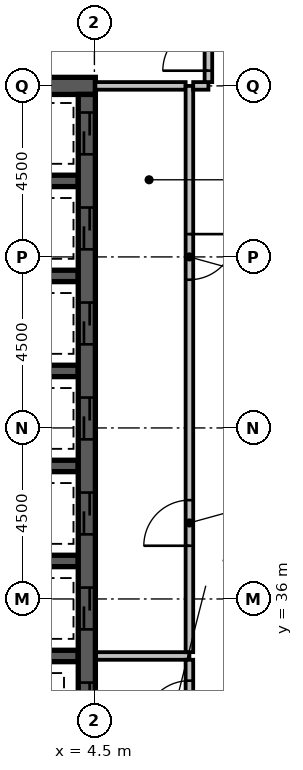
"""IFC4 building model, lengths in metres.
Left out: names, types, materials, properties, quantities, classifications, styles, units other than length and angle.
Written with IfcOpenShell. Run it as: python <this file> out.ifc"""

import sys

from ifc_helpers import new_model, si_unit, direction, frame, frame_2d, origin, place, context, subcontext, project, spatial, rectangle, extrude, element, fill, save


model = new_model("IFC4")
c1 = context("Model", 3, precision=1e-05, world=origin(), true_north=direction((0.0, 1.0)))
c2 = subcontext(c1, "Body", "Model", "MODEL_VIEW")
j1 = project(units=[si_unit("LENGTHUNIT", "METRE"), si_unit("PLANEANGLEUNIT", "RADIAN")], contexts=[c1])
p1 = place(None, origin())
s1 = spatial("IfcSite", under=j1, at=p1, CompositionType="ELEMENT")
p2 = place(p1, origin())
s2 = spatial("IfcBuilding", under=s1, at=p2, CompositionType="ELEMENT")
p3 = place(p2, frame((0.0, 0.0, 179.0)))
s3 = spatial("IfcBuildingStorey", under=s2, at=p3, CompositionType="ELEMENT", Elevation=179.0)
p4 = place(p3, frame((0.275, 49.5, -0.3), z_axis=(0.0, 0.0, 1.0), x_axis=(1.0, 0.0, 0.0)))
e1 = element("IfcWall", 1, at=p4, inside=s3, PredefinedType="SHEAR", context=c2, shape_type="SweptSolid", body=[
    extrude(rectangle(XDim=4.25, YDim=0.45, at=frame_2d((2.125, 0.0))), origin(), (0.0, 0.0, 1.0), 3.6),
])
for number, where, z_axis, x_axis in (
    (2, (0.725, 34.5, -0.3), (0.0, 0.0, 1.0), (1.0, 0.0, 0.0)),
    (3, (0.725, 37.0, -0.3), (0.0, 0.0, 1.0), (1.0, 0.0, 0.0)),
    (4, (0.725, 39.5, -0.3), (0.0, 0.0, 1.0), (1.0, 0.0, 0.0)),
    (5, (0.725, 42.0, -0.3), (0.0, 0.0, 1.0), (1.0, 0.0, 0.0)),
    (6, (0.725, 44.5, -0.3), (0.0, 0.0, 1.0), (1.0, 0.0, 0.0)),
    (7, (0.725, 47.0, -0.3), (0.0, 0.0, 1.0), (1.0, 0.0, 0.0)),
):
    element("IfcWall", number, at=place(p3, frame(where, z_axis=z_axis, x_axis=x_axis)), inside=s3, PredefinedType="SHEAR", context=c2, shape_type="SweptSolid", body=[
        extrude(rectangle(XDim=3.35, YDim=0.3, at=frame_2d((1.675, 0.0))), origin(), (0.0, 0.0, 1.0), 3.6),
    ])
p5 = place(p3, frame((4.3, 27.15, -0.3), z_axis=(0.0, 0.0, 1.0), x_axis=(0.0, 1.0, 0.0)))
e8 = element("IfcWall", 8, at=p5, inside=s3, PredefinedType="SHEAR", context=c2, shape_type="SweptSolid", body=[
    extrude(rectangle(XDim=22.125, YDim=0.45, at=frame_2d((11.062, 0.0))), origin(), (0.0, 0.0, 1.0), 3.6),
])
p6 = place(p5, frame((3.05, 0.0, 0.3)))
e9 = element("IfcOpeningElement", 9, at=p6, cuts=e8, PredefinedType="OPENING", context=c2, shape_type="SweptSolid", body=[
    extrude(rectangle(XDim=1.1, YDim=2.1, at=frame_2d((0.55, 1.05))), frame((0.0, 0.237, 0.0), z_axis=(0.0, -1.0, 0.0), x_axis=(1.0, 0.0, 0.0)), (0.0, 0.0, 1.0), 0.474),
])
p7 = place(p5, frame((0.55, 0.0, 0.3)))
e10 = element("IfcOpeningElement", 10, at=p7, cuts=e8, PredefinedType="OPENING", context=c2, shape_type="SweptSolid", body=[
    extrude(rectangle(XDim=1.1, YDim=2.1, at=frame_2d((0.55, 1.05))), frame((0.0, 0.237, 0.0), z_axis=(0.0, -1.0, 0.0), x_axis=(1.0, 0.0, 0.0)), (0.0, 0.0, 1.0), 0.474),
])
p8 = place(p5, frame((20.55, 0.0, 0.3)))
e11 = element("IfcOpeningElement", 11, at=p8, cuts=e8, PredefinedType="OPENING", context=c2, shape_type="SweptSolid", body=[
    extrude(rectangle(XDim=1.1, YDim=2.1, at=frame_2d((0.55, 1.05))), frame((0.0, 0.237, 0.0), z_axis=(0.0, -1.0, 0.0), x_axis=(1.0, 0.0, 0.0)), (0.0, 0.0, 1.0), 0.474),
])
p9 = place(p5, frame((18.05, 0.0, 0.3)))
e12 = element("IfcOpeningElement", 12, at=p9, cuts=e8, PredefinedType="OPENING", context=c2, shape_type="SweptSolid", body=[
    extrude(rectangle(XDim=1.1, YDim=2.1, at=frame_2d((0.55, 1.05))), frame((0.0, 0.237, 0.0), z_axis=(0.0, -1.0, 0.0), x_axis=(1.0, 0.0, 0.0)), (0.0, 0.0, 1.0), 0.474),
])
p10 = place(p5, frame((15.55, 0.0, 0.3)))
e13 = element("IfcOpeningElement", 13, at=p10, cuts=e8, PredefinedType="OPENING", context=c2, shape_type="SweptSolid", body=[
    extrude(rectangle(XDim=1.1, YDim=2.1, at=frame_2d((0.55, 1.05))), frame((0.0, 0.237, 0.0), z_axis=(0.0, -1.0, 0.0), x_axis=(1.0, 0.0, 0.0)), (0.0, 0.0, 1.0), 0.474),
])
p11 = place(p5, frame((13.05, 0.0, 0.3)))
e14 = element("IfcOpeningElement", 14, at=p11, cuts=e8, PredefinedType="OPENING", context=c2, shape_type="SweptSolid", body=[
    extrude(rectangle(XDim=1.1, YDim=2.1, at=frame_2d((0.55, 1.05))), frame((0.0, 0.237, 0.0), z_axis=(0.0, -1.0, 0.0), x_axis=(1.0, 0.0, 0.0)), (0.0, 0.0, 1.0), 0.474),
])
p12 = place(p5, frame((10.55, 0.0, 0.3)))
e15 = element("IfcOpeningElement", 15, at=p12, cuts=e8, PredefinedType="OPENING", context=c2, shape_type="SweptSolid", body=[
    extrude(rectangle(XDim=1.1, YDim=2.1, at=frame_2d((0.55, 1.05))), frame((0.0, 0.237, 0.0), z_axis=(0.0, -1.0, 0.0), x_axis=(1.0, 0.0, 0.0)), (0.0, 0.0, 1.0), 0.474),
])
p13 = place(p5, frame((8.05, 0.0, 0.3)))
e16 = element("IfcOpeningElement", 16, at=p13, cuts=e8, PredefinedType="OPENING", context=c2, shape_type="SweptSolid", body=[
    extrude(rectangle(XDim=1.1, YDim=2.1, at=frame_2d((0.55, 1.05))), frame((0.0, 0.237, 0.0), z_axis=(0.0, -1.0, 0.0), x_axis=(1.0, 0.0, 0.0)), (0.0, 0.0, 1.0), 0.474),
])
p14 = place(p5, frame((5.55, 0.0, 0.3)))
e17 = element("IfcOpeningElement", 17, at=p14, cuts=e8, PredefinedType="OPENING", context=c2, shape_type="SweptSolid", body=[
    extrude(rectangle(XDim=1.1, YDim=2.1, at=frame_2d((0.55, 1.05))), frame((0.0, 0.237, 0.0), z_axis=(0.0, -1.0, 0.0), x_axis=(1.0, 0.0, 0.0)), (0.0, 0.0, 1.0), 0.474),
])
p15 = place(p3, frame((4.545, 34.5, 0.0), z_axis=(0.0, 0.0, 1.0), x_axis=(1.0, 0.0, 0.0)))
e18 = element("IfcWall", 18, at=p15, inside=s3, PredefinedType="PARTITIONING", context=c2, shape_type="SweptSolid", body=[
    extrude(rectangle(XDim=2.455, YDim=0.2, at=frame_2d((1.228, 0.0))), origin(), (0.0, 0.0, 1.0), 3.3),
])
p16 = place(p3, frame((7.0, 34.6, 0.0), z_axis=(0.0, 0.0, 1.0), x_axis=(0.0, 1.0, 0.0)))
e19 = element("IfcWall", 19, at=p16, inside=s3, PredefinedType="PARTITIONING", context=c2, shape_type="SweptSolid", body=[
    extrude(rectangle(XDim=14.9, YDim=0.2, at=frame_2d((7.45, 0.0))), origin(), (0.0, 0.0, 1.0), 3.3),
])
p17 = place(p16, frame((2.8, 0.0, 0.0)))
e20 = element("IfcOpeningElement", 20, at=p17, cuts=e19, PredefinedType="OPENING", context=c2, shape_type="SweptSolid", body=[
    extrude(rectangle(XDim=1.2, YDim=2.1, at=frame_2d((0.6, 1.05))), frame((0.0, 0.112, 0.0), z_axis=(0.0, -1.0, 0.0), x_axis=(1.0, 0.0, 0.0)), (0.0, 0.0, 1.0), 0.224),
])
p18 = place(p16, frame((9.8, 0.0, 0.0)))
e21 = element("IfcOpeningElement", 21, at=p18, cuts=e19, PredefinedType="OPENING", context=c2, shape_type="SweptSolid", body=[
    extrude(rectangle(XDim=1.2, YDim=2.1, at=frame_2d((0.6, 1.05))), frame((0.0, 0.112, 0.0), z_axis=(0.0, -1.0, 0.0), x_axis=(1.0, 0.0, 0.0)), (0.0, 0.0, 1.0), 0.224),
])
p19 = place(p3, frame((4.525, 49.5, 0.0), z_axis=(0.0, 0.0, 1.0), x_axis=(1.0, 0.0, 0.0)))
e22 = element("IfcWall", 22, at=p19, inside=s3, PredefinedType="PARTITIONING", context=c2, shape_type="SweptSolid", body=[
    extrude(rectangle(XDim=2.375, YDim=0.2, at=frame_2d((1.188, 0.0))), origin(), (0.0, 0.0, 1.0), 3.3),
])
p20 = place(p3, frame((7.0, 32.1, 0.0), z_axis=(0.0, 0.0, 1.0), x_axis=(0.0, 1.0, 0.0)))
e23 = element("IfcWall", 23, at=p20, inside=s3, PredefinedType="PARTITIONING", context=c2, shape_type="SweptSolid", body=[
    extrude(rectangle(XDim=2.3, YDim=0.2, at=frame_2d((1.15, 0.0))), origin(), (0.0, 0.0, 1.0), 3.3),
])
p21 = place(p20, frame((0.55, 0.0, 0.0)))
e24 = element("IfcOpeningElement", 24, at=p21, cuts=e23, PredefinedType="OPENING", context=c2, shape_type="SweptSolid", body=[
    extrude(rectangle(XDim=1.2, YDim=2.1, at=frame_2d((0.6, 1.05))), frame((0.0, 0.112, 0.0), z_axis=(0.0, -1.0, 0.0), x_axis=(1.0, 0.0, 0.0)), (0.0, 0.0, 1.0), 0.224),
])
p22 = place(p3, frame((7.1, 49.5, 0.0), z_axis=(0.0, 0.0, 1.0), x_axis=(1.0, 0.0, 0.0)))
e25 = element("IfcWall", 25, at=p22, inside=s3, PredefinedType="PARTITIONING", context=c2, shape_type="SweptSolid", body=[
    extrude(rectangle(XDim=0.4, YDim=0.2, at=frame_2d((0.2, 0.0))), origin(), (0.0, 0.0, 1.0), 3.3),
])
p23 = place(p3, frame((7.5, 49.6, 0.0), z_axis=(0.0, 0.0, 1.0), x_axis=(0.0, 1.0, 0.0)))
e26 = element("IfcWall", 26, at=p23, inside=s3, PredefinedType="PARTITIONING", context=c2, shape_type="SweptSolid", body=[
    extrude(rectangle(XDim=3.9, YDim=0.2, at=frame_2d((1.95, 0.0))), origin(), (0.0, 0.0, 1.0), 3.3),
])
p24 = place(p23, frame((0.3, 0.0, 0.0)))
e27 = element("IfcOpeningElement", 27, at=p24, cuts=e26, PredefinedType="OPENING", context=c2, shape_type="SweptSolid", body=[
    extrude(rectangle(XDim=1.2, YDim=2.1, at=frame_2d((0.6, 1.05))), frame((0.0, 0.112, 0.0), z_axis=(0.0, -1.0, 0.0), x_axis=(1.0, 0.0, 0.0)), (0.0, 0.0, 1.0), 0.224),
])
p25 = place(p24, origin())
e28 = element("IfcDoor", 28, at=p25, inside=s3, OperationType="SINGLE_SWING_LEFT", PredefinedType="DOOR", context=c2, shape_type="SweptSolid", body=[
    extrude(rectangle(XDim=1.2, YDim=2.1, at=frame_2d((0.6, 1.05))), frame((0.0, 0.025, 0.0), z_axis=(0.0, -1.0, 0.0), x_axis=(1.0, 0.0, 0.0)), (0.0, 0.0, 1.0), 0.05),
])
fill(e27, e28)
p26 = place(p8, origin())
e29 = element("IfcDoor", 29, at=p26, inside=s3, OperationType="SLIDING_TO_LEFT", PredefinedType="DOOR", context=c2, shape_type="SweptSolid", body=[
    extrude(rectangle(XDim=1.1, YDim=2.1, at=frame_2d((0.55, 1.05))), frame((0.0, 0.025, 0.0), z_axis=(0.0, -1.0, 0.0), x_axis=(1.0, 0.0, 0.0)), (0.0, 0.0, 1.0), 0.05),
])
fill(e11, e29)
p27 = place(p9, origin())
e30 = element("IfcDoor", 30, at=p27, inside=s3, OperationType="SLIDING_TO_LEFT", PredefinedType="DOOR", context=c2, shape_type="SweptSolid", body=[
    extrude(rectangle(XDim=1.1, YDim=2.1, at=frame_2d((0.55, 1.05))), frame((0.0, 0.025, 0.0), z_axis=(0.0, -1.0, 0.0), x_axis=(1.0, 0.0, 0.0)), (0.0, 0.0, 1.0), 0.05),
])
fill(e12, e30)
p28 = place(p10, origin())
e31 = element("IfcDoor", 31, at=p28, inside=s3, OperationType="SLIDING_TO_LEFT", PredefinedType="DOOR", context=c2, shape_type="SweptSolid", body=[
    extrude(rectangle(XDim=1.1, YDim=2.1, at=frame_2d((0.55, 1.05))), frame((0.0, 0.025, 0.0), z_axis=(0.0, -1.0, 0.0), x_axis=(1.0, 0.0, 0.0)), (0.0, 0.0, 1.0), 0.05),
])
fill(e13, e31)
p29 = place(p11, origin())
e32 = element("IfcDoor", 32, at=p29, inside=s3, OperationType="SLIDING_TO_LEFT", PredefinedType="DOOR", context=c2, shape_type="SweptSolid", body=[
    extrude(rectangle(XDim=1.1, YDim=2.1, at=frame_2d((0.55, 1.05))), frame((0.0, 0.025, 0.0), z_axis=(0.0, -1.0, 0.0), x_axis=(1.0, 0.0, 0.0)), (0.0, 0.0, 1.0), 0.05),
])
fill(e14, e32)
p30 = place(p12, origin())
e33 = element("IfcDoor", 33, at=p30, inside=s3, OperationType="SLIDING_TO_LEFT", PredefinedType="DOOR", context=c2, shape_type="SweptSolid", body=[
    extrude(rectangle(XDim=1.1, YDim=2.1, at=frame_2d((0.55, 1.05))), frame((0.0, 0.025, 0.0), z_axis=(0.0, -1.0, 0.0), x_axis=(1.0, 0.0, 0.0)), (0.0, 0.0, 1.0), 0.05),
])
fill(e15, e33)
p31 = place(p13, origin())
e34 = element("IfcDoor", 34, at=p31, inside=s3, OperationType="SLIDING_TO_LEFT", PredefinedType="DOOR", context=c2, shape_type="SweptSolid", body=[
    extrude(rectangle(XDim=1.1, YDim=2.1, at=frame_2d((0.55, 1.05))), frame((0.0, 0.025, 0.0), z_axis=(0.0, -1.0, 0.0), x_axis=(1.0, 0.0, 0.0)), (0.0, 0.0, 1.0), 0.05),
])
fill(e16, e34)
p32 = place(p17, origin())
e35 = element("IfcDoor", 35, at=p32, inside=s3, OperationType="SINGLE_SWING_LEFT", PredefinedType="DOOR", context=c2, shape_type="SweptSolid", body=[
    extrude(rectangle(XDim=1.2, YDim=2.1, at=frame_2d((0.6, 1.05))), frame((0.0, 0.025, 0.0), z_axis=(0.0, -1.0, 0.0), x_axis=(1.0, 0.0, 0.0)), (0.0, 0.0, 1.0), 0.05),
])
fill(e20, e35)
p33 = place(p18, origin())
e36 = element("IfcDoor", 36, at=p33, inside=s3, OperationType="SINGLE_SWING_RIGHT", PredefinedType="DOOR", context=c2, shape_type="SweptSolid", body=[
    extrude(rectangle(XDim=1.2, YDim=2.1, at=frame_2d((0.6, 1.05))), frame((0.0, 0.025, 0.0), z_axis=(0.0, -1.0, 0.0), x_axis=(1.0, 0.0, 0.0)), (0.0, 0.0, 1.0), 0.05),
])
fill(e21, e36)
p34 = place(p21, origin())
e37 = element("IfcDoor", 37, at=p34, inside=s3, OperationType="SINGLE_SWING_LEFT", PredefinedType="DOOR", context=c2, shape_type="SweptSolid", body=[
    extrude(rectangle(XDim=1.2, YDim=2.1, at=frame_2d((0.6, 1.05))), frame((0.0, 0.025, 0.0), z_axis=(0.0, -1.0, 0.0), x_axis=(1.0, 0.0, 0.0)), (0.0, 0.0, 1.0), 0.05),
])
fill(e24, e37)
p35 = place(p14, origin())
e38 = element("IfcDoor", 38, at=p35, inside=s3, OperationType="SLIDING_TO_LEFT", PredefinedType="DOOR", context=c2, shape_type="SweptSolid", body=[
    extrude(rectangle(XDim=1.1, YDim=2.1, at=frame_2d((0.55, 1.05))), frame((0.0, 0.025, 0.0), z_axis=(0.0, -1.0, 0.0), x_axis=(1.0, 0.0, 0.0)), (0.0, 0.0, 1.0), 0.05),
])
fill(e17, e38)
save(model, sys.argv[1])
